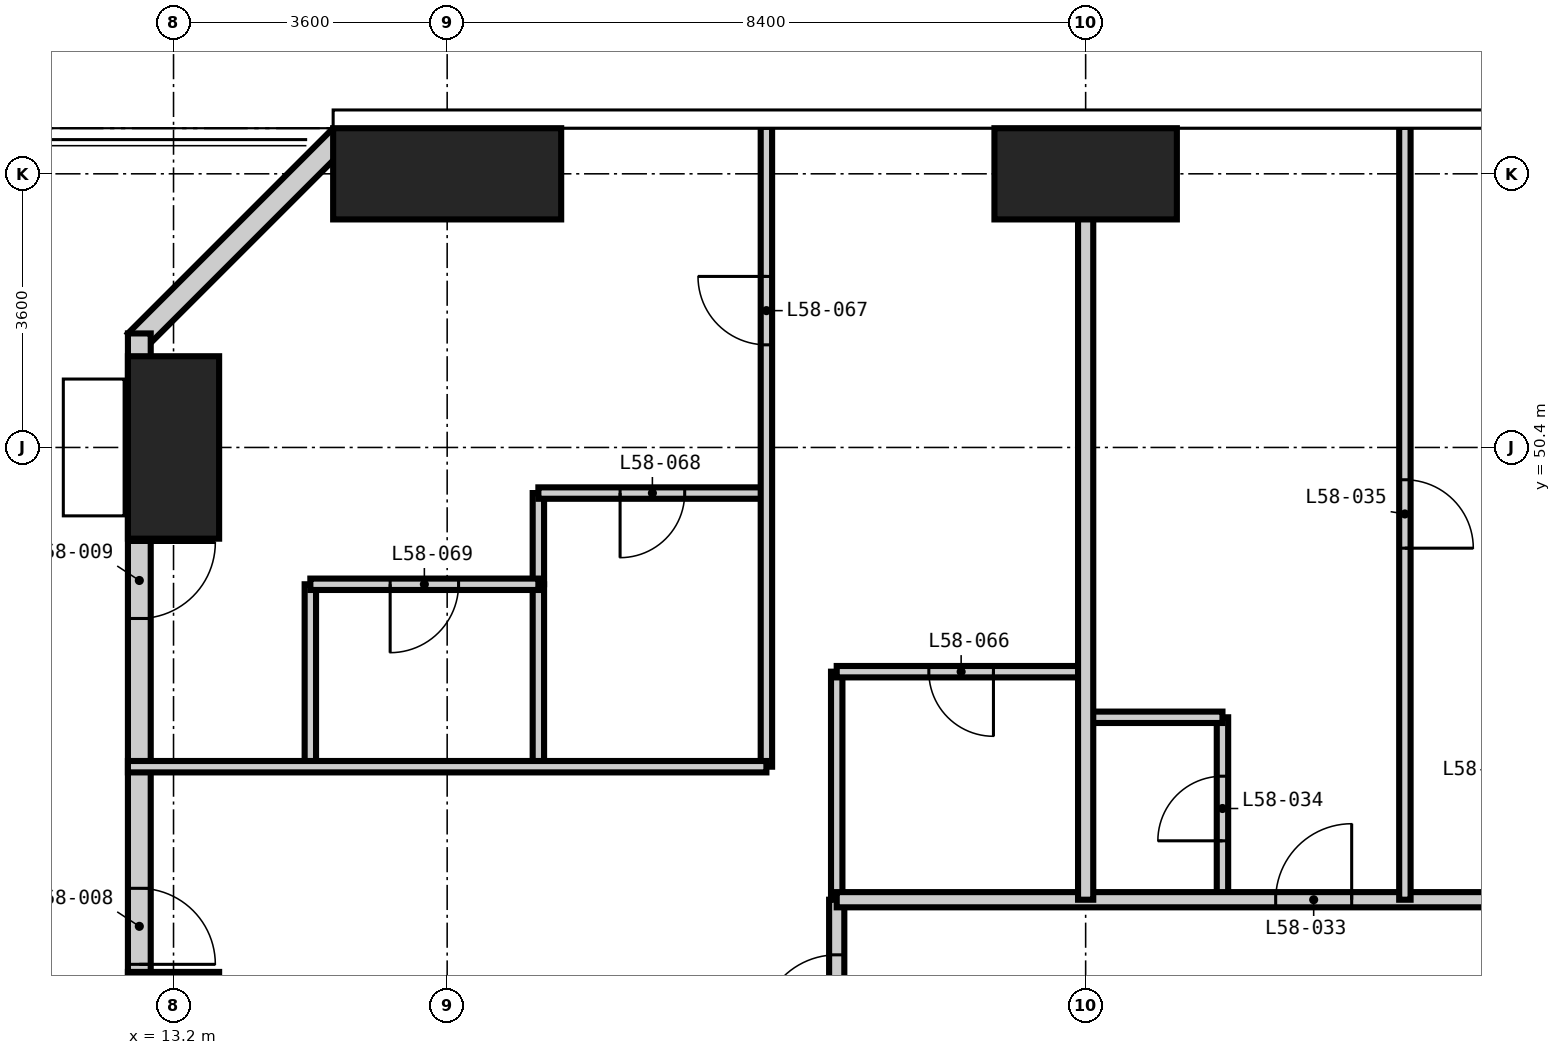
"""IFC4 building model, lengths in metres.
Left out: names, types, materials, properties, quantities, classifications, styles, units other than length and angle.
Written with IfcOpenShell. Run it as: python <this file> out.ifc"""

import sys

from ifc_helpers import new_model, si_unit, direction, frame, frame_2d, origin, origin_2d, place, context, subcontext, project, spatial, rectangle, extrude, element, fill, save


model = new_model("IFC4")
c1 = context("Model", 3, precision=1e-05, world=origin(), true_north=direction((0.0, 1.0)))
c2 = subcontext(c1, "Body", "Model", "MODEL_VIEW")
j1 = project(units=[si_unit("LENGTHUNIT", "METRE"), si_unit("PLANEANGLEUNIT", "RADIAN")], contexts=[c1])
p1 = place(None, origin())
s1 = spatial("IfcSite", under=j1, at=p1, CompositionType="ELEMENT")
p2 = place(p1, origin())
s2 = spatial("IfcBuilding", under=s1, at=p2, CompositionType="ELEMENT")
p3 = place(p2, frame((0.0, 0.0, 225.6)))
s3 = spatial("IfcBuildingStorey", under=s2, at=p3, CompositionType="ELEMENT", Elevation=225.6)
p4 = place(p3, frame((13.2, 42.0, -0.35), z_axis=(0.0, 0.0, 1.0), x_axis=(1.0, 0.0, 0.0)))
e1 = element("IfcColumn", 1, at=p4, inside=s3, PredefinedType="COLUMN", context=c2, shape_type="SweptSolid", body=[
    extrude(rectangle(XDim=1.2, YDim=3.0, at=origin_2d()), origin(), (0.0, 0.0, 1.0), 3.9),
])
p5 = place(p3, frame((13.2, 50.4, -0.35), z_axis=(0.0, 0.0, 1.0), x_axis=(1.0, 0.0, 0.0)))
e2 = element("IfcColumn", 2, at=p5, inside=s3, PredefinedType="COLUMN", context=c2, shape_type="SweptSolid", body=[
    extrude(rectangle(XDim=1.2, YDim=2.4, at=origin_2d()), origin(), (0.0, 0.0, 1.0), 3.9),
])
p6 = place(p3, frame((16.8, 54.0, -0.35), z_axis=(0.0, 0.0, 1.0), x_axis=(1.0, 0.0, 0.0)))
e3 = element("IfcColumn", 3, at=p6, inside=s3, PredefinedType="COLUMN", context=c2, shape_type="SweptSolid", body=[
    extrude(rectangle(XDim=3.0, YDim=1.2, at=origin_2d()), origin(), (0.0, 0.0, 1.0), 3.9),
])
p7 = place(p3, frame((25.2, 54.0, -0.35), z_axis=(0.0, 0.0, 1.0), x_axis=(1.0, 0.0, 0.0)))
e4 = element("IfcColumn", 4, at=p7, inside=s3, PredefinedType="COLUMN", context=c2, shape_type="SweptSolid", body=[
    extrude(rectangle(XDim=2.4, YDim=1.2, at=origin_2d()), origin(), (0.0, 0.0, 1.0), 3.9),
])
p8 = place(p3, frame((15.406, 54.494, 0.0), z_axis=(0.0, 0.0, 1.0), x_axis=(-0.707106781187, -0.707106781187, 0.0)))
e5 = element("IfcWall", 5, at=p8, inside=s3, PredefinedType="SOLIDWALL", context=c2, shape_type="SweptSolid", body=[
    extrude(rectangle(XDim=3.818, YDim=0.3, at=frame_2d((1.909, 0.0))), origin(), (0.0, 0.0, 1.0), 3.55),
])
p9 = place(p3, frame((12.75, 51.9, 0.0), z_axis=(0.0, 0.0, 1.0), x_axis=(0.0, -1.0, 0.0)))
e6 = element("IfcWall", 6, at=p9, inside=s3, PredefinedType="SOLIDWALL", context=c2, shape_type="SweptSolid", body=[
    extrude(rectangle(XDim=45.0, YDim=0.3, at=frame_2d((22.5, 0.0))), origin(), (0.0, 0.0, 1.0), 3.1),
])
p10 = place(p9, frame((41.25, 0.0, 0.0)))
e7 = element("IfcOpeningElement", 7, at=p10, cuts=e6, PredefinedType="OPENING", context=c2, shape_type="SweptSolid", body=[
    extrude(rectangle(XDim=1.0, YDim=2.4, at=frame_2d((0.5, 1.2))), frame((0.0, 0.16, 0.0), z_axis=(0.0, -1.0, 0.0), x_axis=(1.0, 0.0, 0.0)), (0.0, 0.0, 1.0), 0.32),
])
p11 = place(p9, frame((36.7, 0.0, 0.0)))
e8 = element("IfcOpeningElement", 8, at=p11, cuts=e6, PredefinedType="OPENING", context=c2, shape_type="SweptSolid", body=[
    extrude(rectangle(XDim=1.0, YDim=2.4, at=frame_2d((0.5, 1.2))), frame((0.0, 0.16, 0.0), z_axis=(0.0, -1.0, 0.0), x_axis=(1.0, 0.0, 0.0)), (0.0, 0.0, 1.0), 0.32),
])
p12 = place(p9, frame((30.4, 0.0, 0.0)))
e9 = element("IfcOpeningElement", 9, at=p12, cuts=e6, PredefinedType="OPENING", context=c2, shape_type="SweptSolid", body=[
    extrude(rectangle(XDim=1.0, YDim=2.4, at=frame_2d((0.5, 1.2))), frame((0.0, 0.16, 0.0), z_axis=(0.0, -1.0, 0.0), x_axis=(1.0, 0.0, 0.0)), (0.0, 0.0, 1.0), 0.32),
])
p13 = place(p9, frame((31.7, 0.0, 0.6)))
e10 = element("IfcOpeningElement", 10, at=p13, cuts=e6, PredefinedType="OPENING", context=c2, shape_type="SweptSolid", body=[
    extrude(rectangle(XDim=1.8, YDim=2.1, at=frame_2d((0.9, 1.05))), frame((0.0, 0.16, 0.0), z_axis=(0.0, -1.0, 0.0), x_axis=(1.0, 0.0, 0.0)), (0.0, 0.0, 1.0), 0.32),
])
p14 = place(p9, frame((28.0, 0.0, 0.6)))
e11 = element("IfcOpeningElement", 11, at=p14, cuts=e6, PredefinedType="OPENING", context=c2, shape_type="SweptSolid", body=[
    extrude(rectangle(XDim=1.8, YDim=2.1, at=frame_2d((0.9, 1.05))), frame((0.0, 0.16, 0.0), z_axis=(0.0, -1.0, 0.0), x_axis=(1.0, 0.0, 0.0)), (0.0, 0.0, 1.0), 0.32),
])
p15 = place(p9, frame((24.1, 0.0, 0.0)))
e12 = element("IfcOpeningElement", 12, at=p15, cuts=e6, PredefinedType="OPENING", context=c2, shape_type="SweptSolid", body=[
    extrude(rectangle(XDim=1.0, YDim=2.4, at=frame_2d((0.5, 1.2))), frame((0.0, 0.16, 0.0), z_axis=(0.0, -1.0, 0.0), x_axis=(1.0, 0.0, 0.0)), (0.0, 0.0, 1.0), 0.32),
])
p16 = place(p9, frame((19.9, 0.0, 0.0)))
e13 = element("IfcOpeningElement", 13, at=p16, cuts=e6, PredefinedType="OPENING", context=c2, shape_type="SweptSolid", body=[
    extrude(rectangle(XDim=1.0, YDim=2.4, at=frame_2d((0.5, 1.2))), frame((0.0, 0.16, 0.0), z_axis=(0.0, -1.0, 0.0), x_axis=(1.0, 0.0, 0.0)), (0.0, 0.0, 1.0), 0.32),
])
p17 = place(p9, frame((15.7, 0.0, 0.0)))
e14 = element("IfcOpeningElement", 14, at=p17, cuts=e6, PredefinedType="OPENING", context=c2, shape_type="SweptSolid", body=[
    extrude(rectangle(XDim=1.0, YDim=2.4, at=frame_2d((0.5, 1.2))), frame((0.0, 0.16, 0.0), z_axis=(0.0, -1.0, 0.0), x_axis=(1.0, 0.0, 0.0)), (0.0, 0.0, 1.0), 0.32),
])
p18 = place(p9, frame((11.5, 0.0, 0.0)))
e15 = element("IfcOpeningElement", 15, at=p18, cuts=e6, PredefinedType="OPENING", context=c2, shape_type="SweptSolid", body=[
    extrude(rectangle(XDim=1.0, YDim=2.4, at=frame_2d((0.5, 1.2))), frame((0.0, 0.16, 0.0), z_axis=(0.0, -1.0, 0.0), x_axis=(1.0, 0.0, 0.0)), (0.0, 0.0, 1.0), 0.32),
])
p19 = place(p9, frame((7.3, 0.0, 0.0)))
e16 = element("IfcOpeningElement", 16, at=p19, cuts=e6, PredefinedType="OPENING", context=c2, shape_type="SweptSolid", body=[
    extrude(rectangle(XDim=1.0, YDim=2.4, at=frame_2d((0.5, 1.2))), frame((0.0, 0.16, 0.0), z_axis=(0.0, -1.0, 0.0), x_axis=(1.0, 0.0, 0.0)), (0.0, 0.0, 1.0), 0.32),
])
p20 = place(p9, frame((2.75, 0.0, 0.0)))
e17 = element("IfcOpeningElement", 17, at=p20, cuts=e6, PredefinedType="OPENING", context=c2, shape_type="SweptSolid", body=[
    extrude(rectangle(XDim=1.0, YDim=2.4, at=frame_2d((0.5, 1.2))), frame((0.0, 0.16, 0.0), z_axis=(0.0, -1.0, 0.0), x_axis=(1.0, 0.0, 0.0)), (0.0, 0.0, 1.0), 0.32),
])
p21 = place(p3, frame((18.0, 48.6, 0.0), z_axis=(0.0, 0.0, 1.0), x_axis=(0.0, 1.0, 0.0)))
e18 = element("IfcWall", 18, at=p21, inside=s3, PredefinedType="PARTITIONING", context=c2, shape_type="SweptSolid", body=[
    extrude(rectangle(XDim=1.2, YDim=0.15, at=frame_2d((0.6, 0.0))), origin(), (0.0, 0.0, 1.0), 3.55),
])
p22 = place(p3, frame((21.925, 44.45, 0.0), z_axis=(0.0, 0.0, 1.0), x_axis=(0.0, 1.0, 0.0)))
e19 = element("IfcWall", 19, at=p22, inside=s3, PredefinedType="PARTITIONING", context=c2, shape_type="SweptSolid", body=[
    extrude(rectangle(XDim=3.0, YDim=0.15, at=frame_2d((1.5, 0.0))), origin(), (0.0, 0.0, 1.0), 3.55),
])
p23 = place(p3, frame((27.0, 44.45, 0.0), z_axis=(0.0, 0.0, 1.0), x_axis=(0.0, 1.0, 0.0)))
e20 = element("IfcWall", 20, at=p23, inside=s3, PredefinedType="PARTITIONING", context=c2, shape_type="SweptSolid", body=[
    extrude(rectangle(XDim=2.4, YDim=0.15, at=frame_2d((1.2, 0.0))), origin(), (0.0, 0.0, 1.0), 3.55),
])
p24 = place(p23, frame((0.775, 0.0, 0.0)))
e21 = element("IfcOpeningElement", 21, at=p24, cuts=e20, PredefinedType="OPENING", context=c2, shape_type="SweptSolid", body=[
    extrude(rectangle(XDim=0.85, YDim=2.1, at=frame_2d((0.425, 1.05))), frame((0.0, 0.085, 0.0), z_axis=(0.0, -1.0, 0.0), x_axis=(1.0, 0.0, 0.0)), (0.0, 0.0, 1.0), 0.17),
])
p25 = place(p3, frame((25.2, 46.85, 0.0), z_axis=(0.0, 0.0, 1.0), x_axis=(1.0, 0.0, 0.0)))
e22 = element("IfcWall", 22, at=p25, inside=s3, PredefinedType="PARTITIONING", context=c2, shape_type="SweptSolid", body=[
    extrude(rectangle(XDim=1.8, YDim=0.15, at=frame_2d((0.9, 0.0))), origin(), (0.0, 0.0, 1.0), 3.55),
])
p26 = place(p3, frame((21.925, 47.45, 0.0), z_axis=(0.0, 0.0, 1.0), x_axis=(1.0, 0.0, 0.0)))
e23 = element("IfcWall", 23, at=p26, inside=s3, PredefinedType="PARTITIONING", context=c2, shape_type="SweptSolid", body=[
    extrude(rectangle(XDim=3.275, YDim=0.15, at=frame_2d((1.637, 0.0))), origin(), (0.0, 0.0, 1.0), 3.55),
])
p27 = place(p26, frame((1.212, 0.0, 0.0)))
e24 = element("IfcOpeningElement", 24, at=p27, cuts=e23, PredefinedType="OPENING", context=c2, shape_type="SweptSolid", body=[
    extrude(rectangle(XDim=0.85, YDim=2.1, at=frame_2d((0.425, 1.05))), frame((0.0, 0.085, 0.0), z_axis=(0.0, -1.0, 0.0), x_axis=(1.0, 0.0, 0.0)), (0.0, 0.0, 1.0), 0.17),
])
p28 = place(p3, frame((18.0, 49.8, 0.0), z_axis=(0.0, 0.0, 1.0), x_axis=(1.0, 0.0, 0.0)))
e25 = element("IfcWall", 25, at=p28, inside=s3, PredefinedType="PARTITIONING", context=c2, shape_type="SweptSolid", body=[
    extrude(rectangle(XDim=3.0, YDim=0.15, at=frame_2d((1.5, 0.0))), origin(), (0.0, 0.0, 1.0), 3.55),
])
p29 = place(p28, frame((1.075, 0.0, 0.0)))
e26 = element("IfcOpeningElement", 26, at=p29, cuts=e25, PredefinedType="OPENING", context=c2, shape_type="SweptSolid", body=[
    extrude(rectangle(XDim=0.85, YDim=2.1, at=frame_2d((0.425, 1.05))), frame((0.0, 0.085, 0.0), z_axis=(0.0, -1.0, 0.0), x_axis=(1.0, 0.0, 0.0)), (0.0, 0.0, 1.0), 0.17),
])
p30 = place(p3, frame((21.925, 25.2, 0.0), z_axis=(0.0, 0.0, 1.0), x_axis=(0.0, 1.0, 0.0)))
e27 = element("IfcWall", 27, at=p30, inside=s3, PredefinedType="PARTITIONING", context=c2, shape_type="SweptSolid", body=[
    extrude(rectangle(XDim=19.25, YDim=0.2, at=frame_2d((9.625, 0.0))), origin(), (0.0, 0.0, 1.0), 3.55),
])
p31 = place(p30, frame((4.9, 0.0, 0.0)))
e28 = element("IfcOpeningElement", 28, at=p31, cuts=e27, PredefinedType="OPENING", context=c2, shape_type="SweptSolid", body=[
    extrude(rectangle(XDim=1.0, YDim=2.2, at=frame_2d((0.5, 1.1))), frame((0.0, 0.11, 0.0), z_axis=(0.0, -1.0, 0.0), x_axis=(1.0, 0.0, 0.0)), (0.0, 0.0, 1.0), 0.22),
])
p32 = place(p30, frame((10.9, 0.0, 0.0)))
e29 = element("IfcOpeningElement", 29, at=p32, cuts=e27, PredefinedType="OPENING", context=c2, shape_type="SweptSolid", body=[
    extrude(rectangle(XDim=1.0, YDim=2.2, at=frame_2d((0.5, 1.1))), frame((0.0, 0.11, 0.0), z_axis=(0.0, -1.0, 0.0), x_axis=(1.0, 0.0, 0.0)), (0.0, 0.0, 1.0), 0.22),
])
p33 = place(p30, frame((17.525, 0.0, 0.0)))
e30 = element("IfcOpeningElement", 30, at=p33, cuts=e27, PredefinedType="OPENING", context=c2, shape_type="SweptSolid", body=[
    extrude(rectangle(XDim=1.0, YDim=2.2, at=frame_2d((0.5, 1.1))), frame((0.0, 0.11, 0.0), z_axis=(0.0, -1.0, 0.0), x_axis=(1.0, 0.0, 0.0)), (0.0, 0.0, 1.0), 0.22),
])
p34 = place(p3, frame((21.925, 44.45, 0.0), z_axis=(0.0, 0.0, 1.0), x_axis=(1.0, 0.0, 0.0)))
e31 = element("IfcWall", 31, at=p34, inside=s3, PredefinedType="PARTITIONING", context=c2, shape_type="SweptSolid", body=[
    extrude(rectangle(XDim=23.725, YDim=0.2, at=frame_2d((11.862, 0.0))), origin(), (0.0, 0.0, 1.0), 3.55),
])
p35 = place(p34, frame((5.775, 0.0, 0.0)))
e32 = element("IfcOpeningElement", 32, at=p35, cuts=e31, PredefinedType="OPENING", context=c2, shape_type="SweptSolid", body=[
    extrude(rectangle(XDim=1.0, YDim=2.2, at=frame_2d((0.5, 1.1))), frame((0.0, 0.11, 0.0), z_axis=(0.0, -1.0, 0.0), x_axis=(1.0, 0.0, 0.0)), (0.0, 0.0, 1.0), 0.22),
])
p36 = place(p34, frame((16.575, 0.0, 0.0)))
e33 = element("IfcOpeningElement", 33, at=p36, cuts=e31, PredefinedType="OPENING", context=c2, shape_type="SweptSolid", body=[
    extrude(rectangle(XDim=1.0, YDim=2.2, at=frame_2d((0.5, 1.1))), frame((0.0, 0.11, 0.0), z_axis=(0.0, -1.0, 0.0), x_axis=(1.0, 0.0, 0.0)), (0.0, 0.0, 1.0), 0.22),
])
p37 = place(p3, frame((25.2, 44.45, 0.0), z_axis=(0.0, 0.0, 1.0), x_axis=(0.0, 1.0, 0.0)))
e34 = element("IfcWall", 34, at=p37, inside=s3, PredefinedType="PARTITIONING", context=c2, shape_type="SweptSolid", body=[
    extrude(rectangle(XDim=10.168, YDim=0.2, at=frame_2d((5.084, 0.0))), origin(), (0.0, 0.0, 1.0), 3.55),
])
for number, where, z_axis, x_axis in (
    (35, (15.0, 46.2, 0.0), (0.0, 0.0, 1.0), (0.0, 1.0, 0.0)),
    (36, (18.0, 46.2, 0.0), (0.0, 0.0, 1.0), (0.0, 1.0, 0.0)),
):
    element("IfcWall", number, at=place(p3, frame(where, z_axis=z_axis, x_axis=x_axis)), inside=s3, PredefinedType="PARTITIONING", context=c2, shape_type="SweptSolid", body=[
        extrude(rectangle(XDim=2.4, YDim=0.15, at=frame_2d((1.2, 0.0))), origin(), (0.0, 0.0, 1.0), 3.55),
    ])
p38 = place(p3, frame((21.0, 46.2, 0.0), z_axis=(0.0, 0.0, 1.0), x_axis=(0.0, 1.0, 0.0)))
e37 = element("IfcWall", 37, at=p38, inside=s3, PredefinedType="PARTITIONING", context=c2, shape_type="SweptSolid", body=[
    extrude(rectangle(XDim=8.418, YDim=0.15, at=frame_2d((4.209, 0.0))), origin(), (0.0, 0.0, 1.0), 3.55),
])
p39 = place(p38, frame((5.55, 0.0, 0.0)))
e38 = element("IfcOpeningElement", 38, at=p39, cuts=e37, PredefinedType="OPENING", context=c2, shape_type="SweptSolid", body=[
    extrude(rectangle(XDim=0.9, YDim=2.1, at=frame_2d((0.45, 1.05))), frame((0.0, 0.085, 0.0), z_axis=(0.0, -1.0, 0.0), x_axis=(1.0, 0.0, 0.0)), (0.0, 0.0, 1.0), 0.17),
])
p40 = place(p3, frame((29.4, 44.45, 0.0), z_axis=(0.0, 0.0, 1.0), x_axis=(0.0, 1.0, 0.0)))
e39 = element("IfcWall", 39, at=p40, inside=s3, PredefinedType="PARTITIONING", context=c2, shape_type="SweptSolid", body=[
    extrude(rectangle(XDim=10.168, YDim=0.15, at=frame_2d((5.084, 0.0))), origin(), (0.0, 0.0, 1.0), 3.55),
])
p41 = place(p40, frame((4.625, 0.0, 0.0)))
e40 = element("IfcOpeningElement", 40, at=p41, cuts=e39, PredefinedType="OPENING", context=c2, shape_type="SweptSolid", body=[
    extrude(rectangle(XDim=0.9, YDim=2.1, at=frame_2d((0.45, 1.05))), frame((0.0, 0.085, 0.0), z_axis=(0.0, -1.0, 0.0), x_axis=(1.0, 0.0, 0.0)), (0.0, 0.0, 1.0), 0.17),
])
p42 = place(p3, frame((12.6, 46.2, 0.0), z_axis=(0.0, 0.0, 1.0), x_axis=(1.0, 0.0, 0.0)))
e41 = element("IfcWall", 41, at=p42, inside=s3, PredefinedType="PARTITIONING", context=c2, shape_type="SweptSolid", body=[
    extrude(rectangle(XDim=8.4, YDim=0.15, at=frame_2d((4.2, 0.0))), origin(), (0.0, 0.0, 1.0), 3.55),
])
p43 = place(p3, frame((15.0, 48.6, 0.0), z_axis=(0.0, 0.0, 1.0), x_axis=(1.0, 0.0, 0.0)))
e42 = element("IfcWall", 42, at=p43, inside=s3, PredefinedType="PARTITIONING", context=c2, shape_type="SweptSolid", body=[
    extrude(rectangle(XDim=3.0, YDim=0.15, at=frame_2d((1.5, 0.0))), origin(), (0.0, 0.0, 1.0), 3.55),
])
p44 = place(p43, frame((1.05, 0.0, 0.0)))
e43 = element("IfcOpeningElement", 43, at=p44, cuts=e42, PredefinedType="OPENING", context=c2, shape_type="SweptSolid", body=[
    extrude(rectangle(XDim=0.9, YDim=2.1, at=frame_2d((0.45, 1.05))), frame((0.0, 0.085, 0.0), z_axis=(0.0, -1.0, 0.0), x_axis=(1.0, 0.0, 0.0)), (0.0, 0.0, 1.0), 0.17),
])
p45 = place(p19, origin())
e44 = element("IfcDoor", 44, at=p45, inside=s3, OperationType="SINGLE_SWING_RIGHT", PredefinedType="DOOR", context=c2, shape_type="SweptSolid", body=[
    extrude(rectangle(XDim=1.0, YDim=2.4, at=frame_2d((0.5, 1.2))), frame((0.0, 0.025, 0.0), z_axis=(0.0, -1.0, 0.0), x_axis=(1.0, 0.0, 0.0)), (0.0, 0.0, 1.0), 0.05),
])
fill(e16, e44)
p46 = place(p20, origin())
e45 = element("IfcDoor", 45, at=p46, inside=s3, OperationType="SINGLE_SWING_LEFT", PredefinedType="DOOR", context=c2, shape_type="SweptSolid", body=[
    extrude(rectangle(XDim=1.0, YDim=2.4, at=frame_2d((0.5, 1.2))), frame((0.0, 0.025, 0.0), z_axis=(0.0, -1.0, 0.0), x_axis=(1.0, 0.0, 0.0)), (0.0, 0.0, 1.0), 0.05),
])
fill(e17, e45)
p47 = place(p35, origin())
e46 = element("IfcDoor", 46, at=p47, inside=s3, OperationType="SINGLE_SWING_RIGHT", PredefinedType="DOOR", context=c2, shape_type="SweptSolid", body=[
    extrude(rectangle(XDim=1.0, YDim=2.2, at=frame_2d((0.5, 1.1))), frame((0.0, 0.025, 0.0), z_axis=(0.0, -1.0, 0.0), x_axis=(1.0, 0.0, 0.0)), (0.0, 0.0, 1.0), 0.05),
])
fill(e32, e46)
p48 = place(p24, origin())
e47 = element("IfcDoor", 47, at=p48, inside=s3, OperationType="SINGLE_SWING_LEFT", PredefinedType="DOOR", context=c2, shape_type="SweptSolid", body=[
    extrude(rectangle(XDim=0.85, YDim=2.1, at=frame_2d((0.425, 1.05))), frame((0.0, 0.025, 0.0), z_axis=(0.0, -1.0, 0.0), x_axis=(1.0, 0.0, 0.0)), (0.0, 0.0, 1.0), 0.05),
])
fill(e21, e47)
p49 = place(p41, frame((0.9, 0.0, 0.0), z_axis=(0.0, 0.0, 1.0), x_axis=(-1.0, 0.0, 0.0)))
e48 = element("IfcDoor", 48, at=p49, inside=s3, OperationType="SINGLE_SWING_RIGHT", PredefinedType="DOOR", context=c2, shape_type="SweptSolid", body=[
    extrude(rectangle(XDim=0.9, YDim=2.1, at=frame_2d((0.45, 1.05))), frame((0.0, 0.025, 0.0), z_axis=(0.0, -1.0, 0.0), x_axis=(1.0, 0.0, 0.0)), (0.0, 0.0, 1.0), 0.05),
])
fill(e40, e48)
p50 = place(p33, origin())
e49 = element("IfcDoor", 49, at=p50, inside=s3, OperationType="SINGLE_SWING_LEFT", PredefinedType="DOOR", context=c2, shape_type="SweptSolid", body=[
    extrude(rectangle(XDim=1.0, YDim=2.2, at=frame_2d((0.5, 1.1))), frame((0.0, 0.025, 0.0), z_axis=(0.0, -1.0, 0.0), x_axis=(1.0, 0.0, 0.0)), (0.0, 0.0, 1.0), 0.05),
])
fill(e30, e49)
p51 = place(p27, frame((0.85, 0.0, 0.0), z_axis=(0.0, 0.0, 1.0), x_axis=(-1.0, 0.0, 0.0)))
e50 = element("IfcDoor", 50, at=p51, inside=s3, OperationType="SINGLE_SWING_LEFT", PredefinedType="DOOR", context=c2, shape_type="SweptSolid", body=[
    extrude(rectangle(XDim=0.85, YDim=2.1, at=frame_2d((0.425, 1.05))), frame((0.0, 0.025, 0.0), z_axis=(0.0, -1.0, 0.0), x_axis=(1.0, 0.0, 0.0)), (0.0, 0.0, 1.0), 0.05),
])
fill(e24, e50)
p52 = place(p39, origin())
e51 = element("IfcDoor", 51, at=p52, inside=s3, OperationType="SINGLE_SWING_RIGHT", PredefinedType="DOOR", context=c2, shape_type="SweptSolid", body=[
    extrude(rectangle(XDim=0.9, YDim=2.1, at=frame_2d((0.45, 1.05))), frame((0.0, 0.025, 0.0), z_axis=(0.0, -1.0, 0.0), x_axis=(1.0, 0.0, 0.0)), (0.0, 0.0, 1.0), 0.05),
])
fill(e38, e51)
p53 = place(p29, frame((0.85, 0.0, 0.0), z_axis=(0.0, 0.0, 1.0), x_axis=(-1.0, 0.0, 0.0)))
e52 = element("IfcDoor", 52, at=p53, inside=s3, OperationType="SINGLE_SWING_RIGHT", PredefinedType="DOOR", context=c2, shape_type="SweptSolid", body=[
    extrude(rectangle(XDim=0.85, YDim=2.1, at=frame_2d((0.425, 1.05))), frame((0.0, 0.025, 0.0), z_axis=(0.0, -1.0, 0.0), x_axis=(1.0, 0.0, 0.0)), (0.0, 0.0, 1.0), 0.05),
])
fill(e26, e52)
p54 = place(p44, frame((0.9, 0.0, 0.0), z_axis=(0.0, 0.0, 1.0), x_axis=(-1.0, 0.0, 0.0)))
e53 = element("IfcDoor", 53, at=p54, inside=s3, OperationType="SINGLE_SWING_RIGHT", PredefinedType="DOOR", context=c2, shape_type="SweptSolid", body=[
    extrude(rectangle(XDim=0.9, YDim=2.1, at=frame_2d((0.45, 1.05))), frame((0.0, 0.025, 0.0), z_axis=(0.0, -1.0, 0.0), x_axis=(1.0, 0.0, 0.0)), (0.0, 0.0, 1.0), 0.05),
])
fill(e43, e53)
save(model, sys.argv[1])
